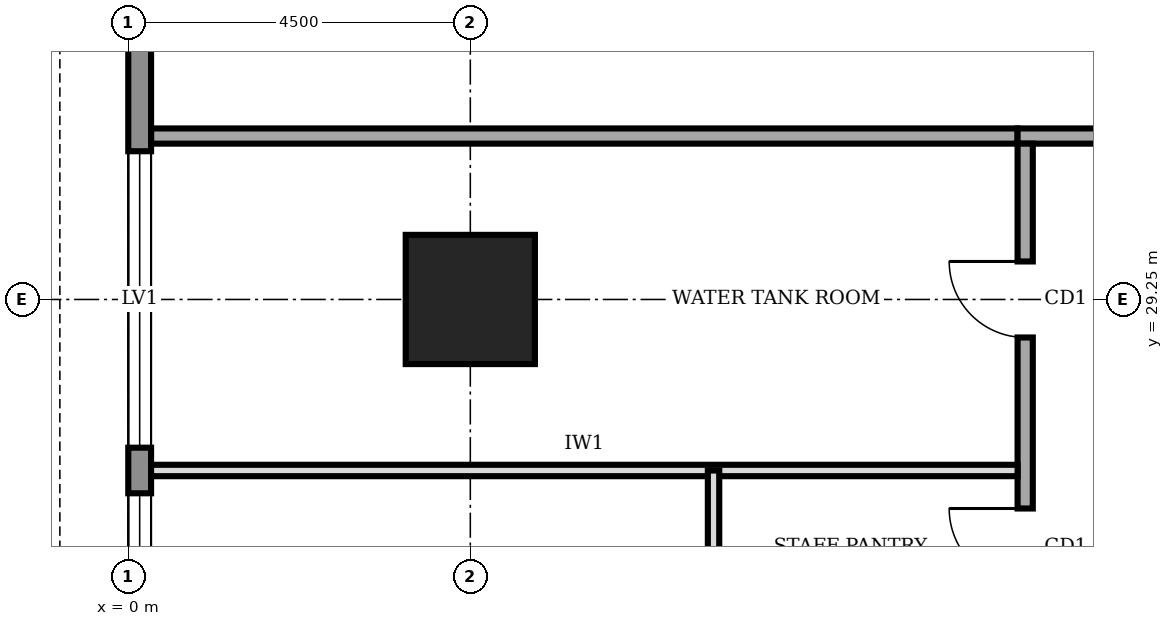
"""IFC4 building model, lengths in metres.
Left out: names, types, materials, properties, quantities, classifications, styles, units other than length and angle.
Written with IfcOpenShell. Run it as: python <this file> out.ifc"""

import sys

from ifc_helpers import new_model, si_unit, direction, frame, frame_2d, origin, origin_2d, place, context, subcontext, project, spatial, rectangle, extrude, element, fill, save


model = new_model("IFC4")
c1 = context("Model", 3, precision=1e-05, world=origin(), true_north=direction((0.0, 1.0)))
c2 = subcontext(c1, "Body", "Model", "MODEL_VIEW")
j1 = project(units=[si_unit("LENGTHUNIT", "METRE"), si_unit("PLANEANGLEUNIT", "RADIAN")], contexts=[c1])
p1 = place(None, origin())
s1 = spatial("IfcSite", under=j1, at=p1, CompositionType="ELEMENT")
p2 = place(p1, origin())
s2 = spatial("IfcBuilding", under=s1, at=p2, CompositionType="ELEMENT")
p3 = place(p2, frame((0.0, 0.0, 289.0)))
s3 = spatial("IfcBuildingStorey", under=s2, at=p3, CompositionType="ELEMENT", Elevation=289.0)
p4 = place(p3, frame((4.5, 29.25, 0.0), z_axis=(0.0, 0.0, 1.0), x_axis=(1.0, 0.0, 0.0)))
e1 = element("IfcColumn", 1, at=p4, inside=s3, PredefinedType="COLUMN", context=c2, shape_type="SweptSolid", body=[
    extrude(rectangle(XDim=1.7, YDim=1.7, at=origin_2d()), origin(), (0.0, 0.0, 1.0), 4.0),
])
p5 = place(p3, frame((0.15, 35.98, 0.0), z_axis=(0.0, 0.0, 1.0), x_axis=(0.0, -1.0, 0.0)))
e2 = element("IfcWall", 2, at=p5, inside=s3, PredefinedType="STANDARD", context=c2, shape_type="SweptSolid", body=[
    extrude(rectangle(XDim=31.46, YDim=0.3, at=frame_2d((15.73, 0.0))), origin(), (0.0, 0.0, 1.0), 3.75),
])
p6 = place(p5, frame((27.28, 0.0, 0.9)))
e3 = element("IfcOpeningElement", 3, at=p6, cuts=e2, PredefinedType="OPENING", context=c2, shape_type="SweptSolid", body=[
    extrude(rectangle(XDim=3.9, YDim=2.2, at=frame_2d((1.95, 1.1))), frame((0.0, 0.16, 0.0), z_axis=(0.0, -1.0, 0.0), x_axis=(1.0, 0.0, 0.0)), (0.0, 0.0, 1.0), 0.32),
])
p7 = place(p5, frame((22.78, 0.0, 0.9)))
e4 = element("IfcOpeningElement", 4, at=p7, cuts=e2, PredefinedType="OPENING", context=c2, shape_type="SweptSolid", body=[
    extrude(rectangle(XDim=3.9, YDim=2.2, at=frame_2d((1.95, 1.1))), frame((0.0, 0.16, 0.0), z_axis=(0.0, -1.0, 0.0), x_axis=(1.0, 0.0, 0.0)), (0.0, 0.0, 1.0), 0.32),
])
p8 = place(p5, frame((18.28, 0.0, 0.9)))
e5 = element("IfcOpeningElement", 5, at=p8, cuts=e2, PredefinedType="OPENING", context=c2, shape_type="SweptSolid", body=[
    extrude(rectangle(XDim=3.9, YDim=2.2, at=frame_2d((1.95, 1.1))), frame((0.0, 0.16, 0.0), z_axis=(0.0, -1.0, 0.0), x_axis=(1.0, 0.0, 0.0)), (0.0, 0.0, 1.0), 0.32),
])
p9 = place(p5, frame((13.78, 0.0, 0.9)))
e6 = element("IfcOpeningElement", 6, at=p9, cuts=e2, PredefinedType="OPENING", context=c2, shape_type="SweptSolid", body=[
    extrude(rectangle(XDim=3.9, YDim=2.2, at=frame_2d((1.95, 1.1))), frame((0.0, 0.16, 0.0), z_axis=(0.0, -1.0, 0.0), x_axis=(1.0, 0.0, 0.0)), (0.0, 0.0, 1.0), 0.32),
])
p10 = place(p5, frame((9.28, 0.0, 0.9)))
e7 = element("IfcOpeningElement", 7, at=p10, cuts=e2, PredefinedType="OPENING", context=c2, shape_type="SweptSolid", body=[
    extrude(rectangle(XDim=3.9, YDim=2.2, at=frame_2d((1.95, 1.1))), frame((0.0, 0.16, 0.0), z_axis=(0.0, -1.0, 0.0), x_axis=(1.0, 0.0, 0.0)), (0.0, 0.0, 1.0), 0.32),
])
p11 = place(p5, frame((4.78, 0.0, 0.9)))
e8 = element("IfcOpeningElement", 8, at=p11, cuts=e2, PredefinedType="OPENING", context=c2, shape_type="SweptSolid", body=[
    extrude(rectangle(XDim=3.9, YDim=2.2, at=frame_2d((1.95, 1.1))), frame((0.0, 0.16, 0.0), z_axis=(0.0, -1.0, 0.0), x_axis=(1.0, 0.0, 0.0)), (0.0, 0.0, 1.0), 0.32),
])
p12 = place(p3, frame((28.6, 31.4, 0.0), z_axis=(0.0, 0.0, 1.0), x_axis=(-1.0, 0.0, 0.0)))
e9 = element("IfcWall", 9, at=p12, inside=s3, PredefinedType="SOLIDWALL", context=c2, shape_type="SweptSolid", body=[
    extrude(rectangle(XDim=16.9, YDim=0.2, at=frame_2d((8.45, 0.0))), origin(), (0.0, 0.0, 1.0), 3.75),
])
p13 = place(p12, frame((12.55, 0.0, 0.0)))
e10 = element("IfcOpeningElement", 10, at=p13, cuts=e9, PredefinedType="OPENING", context=c2, shape_type="SweptSolid", body=[
    extrude(rectangle(XDim=2.4, YDim=2.7, at=frame_2d((1.2, 1.35))), frame((0.0, 0.11, 0.0), z_axis=(0.0, -1.0, 0.0), x_axis=(1.0, 0.0, 0.0)), (0.0, 0.0, 1.0), 0.22),
])
p14 = place(p12, frame((4.3, 0.0, 0.0)))
e11 = element("IfcOpeningElement", 11, at=p14, cuts=e9, PredefinedType="OPENING", context=c2, shape_type="SweptSolid", body=[
    extrude(rectangle(XDim=1.8, YDim=2.1, at=frame_2d((0.9, 1.05))), frame((0.0, 0.11, 0.0), z_axis=(0.0, -1.0, 0.0), x_axis=(1.0, 0.0, 0.0)), (0.0, 0.0, 1.0), 0.22),
])
p15 = place(p3, frame((11.8, 31.3, 0.0), z_axis=(0.0, 0.0, 1.0), x_axis=(0.0, -1.0, 0.0)))
e12 = element("IfcWall", 12, at=p15, inside=s3, PredefinedType="SOLIDWALL", context=c2, shape_type="SweptSolid", body=[
    extrude(rectangle(XDim=22.3, YDim=0.2, at=frame_2d((11.15, 0.0))), origin(), (0.0, 0.0, 1.0), 3.75),
])
p16 = place(p15, frame((19.55, 0.0, 0.0)))
e13 = element("IfcOpeningElement", 13, at=p16, cuts=e12, PredefinedType="OPENING", context=c2, shape_type="SweptSolid", body=[
    extrude(rectangle(XDim=1.0, YDim=2.1, at=frame_2d((0.5, 1.05))), frame((0.0, 0.11, 0.0), z_axis=(0.0, -1.0, 0.0), x_axis=(1.0, 0.0, 0.0)), (0.0, 0.0, 1.0), 0.22),
])
p17 = place(p15, frame((15.45, 0.0, 0.0)))
e14 = element("IfcOpeningElement", 14, at=p17, cuts=e12, PredefinedType="OPENING", context=c2, shape_type="SweptSolid", body=[
    extrude(rectangle(XDim=0.9, YDim=2.1, at=frame_2d((0.45, 1.05))), frame((0.0, 0.11, 0.0), z_axis=(0.0, -1.0, 0.0), x_axis=(1.0, 0.0, 0.0)), (0.0, 0.0, 1.0), 0.22),
])
p18 = place(p15, frame((12.45, 0.0, 0.0)))
e15 = element("IfcOpeningElement", 15, at=p18, cuts=e12, PredefinedType="OPENING", context=c2, shape_type="SweptSolid", body=[
    extrude(rectangle(XDim=0.9, YDim=2.1, at=frame_2d((0.45, 1.05))), frame((0.0, 0.11, 0.0), z_axis=(0.0, -1.0, 0.0), x_axis=(1.0, 0.0, 0.0)), (0.0, 0.0, 1.0), 0.22),
])
p19 = place(p15, frame((7.6, 0.0, 0.0)))
e16 = element("IfcOpeningElement", 16, at=p19, cuts=e12, PredefinedType="OPENING", context=c2, shape_type="SweptSolid", body=[
    extrude(rectangle(XDim=0.9, YDim=2.1, at=frame_2d((0.45, 1.05))), frame((0.0, 0.11, 0.0), z_axis=(0.0, -1.0, 0.0), x_axis=(1.0, 0.0, 0.0)), (0.0, 0.0, 1.0), 0.22),
])
p20 = place(p15, frame((4.8, 0.0, 0.0)))
e17 = element("IfcOpeningElement", 17, at=p20, cuts=e12, PredefinedType="OPENING", context=c2, shape_type="SweptSolid", body=[
    extrude(rectangle(XDim=1.0, YDim=2.1, at=frame_2d((0.5, 1.05))), frame((0.0, 0.11, 0.0), z_axis=(0.0, -1.0, 0.0), x_axis=(1.0, 0.0, 0.0)), (0.0, 0.0, 1.0), 0.22),
])
p21 = place(p15, frame((10.3, 0.0, 0.0)))
e18 = element("IfcOpeningElement", 18, at=p21, cuts=e12, PredefinedType="OPENING", context=c2, shape_type="SweptSolid", body=[
    extrude(rectangle(XDim=1.0, YDim=2.1, at=frame_2d((0.5, 1.05))), frame((0.0, 0.11, 0.0), z_axis=(0.0, -1.0, 0.0), x_axis=(1.0, 0.0, 0.0)), (0.0, 0.0, 1.0), 0.22),
])
p22 = place(p15, frame((1.55, 0.0, 0.0)))
e19 = element("IfcOpeningElement", 19, at=p22, cuts=e12, PredefinedType="OPENING", context=c2, shape_type="SweptSolid", body=[
    extrude(rectangle(XDim=1.0, YDim=2.1, at=frame_2d((0.5, 1.05))), frame((0.0, 0.11, 0.0), z_axis=(0.0, -1.0, 0.0), x_axis=(1.0, 0.0, 0.0)), (0.0, 0.0, 1.0), 0.22),
])
p23 = place(p3, frame((0.3, 31.4, 0.0), z_axis=(0.0, 0.0, 1.0), x_axis=(1.0, 0.0, 0.0)))
e20 = element("IfcWall", 20, at=p23, inside=s3, PredefinedType="SOLIDWALL", context=c2, shape_type="SweptSolid", body=[
    extrude(rectangle(XDim=11.4, YDim=0.2, at=frame_2d((5.7, 0.0))), origin(), (0.0, 0.0, 1.0), 3.75),
])
p24 = place(p3, frame((0.3, 27.0, 0.0), z_axis=(0.0, 0.0, 1.0), x_axis=(1.0, 0.0, 0.0)))
e21 = element("IfcWall", 21, at=p24, inside=s3, PredefinedType="PARTITIONING", context=c2, shape_type="SweptSolid", body=[
    extrude(rectangle(XDim=11.4, YDim=0.15, at=frame_2d((5.7, 0.0))), origin(), (0.0, 0.0, 1.0), 3.75),
])
p25 = place(p3, frame((7.7, 25.0, 0.0), z_axis=(0.0, 0.0, 1.0), x_axis=(0.0, 1.0, 0.0)))
e22 = element("IfcWall", 22, at=p25, inside=s3, PredefinedType="PARTITIONING", context=c2, shape_type="SweptSolid", body=[
    extrude(rectangle(XDim=2.0, YDim=0.15, at=frame_2d((1.0, 0.0))), origin(), (0.0, 0.0, 1.0), 3.75),
])
p26 = place(p10, origin())
e23 = element("IfcWindow", 23, at=p26, inside=s3, PartitioningType="SINGLE_PANEL", PredefinedType="WINDOW", context=c2, shape_type="SweptSolid", body=[
    extrude(rectangle(XDim=3.9, YDim=2.2, at=frame_2d((1.95, 1.1))), frame((0.0, 0.03, 0.0), z_axis=(0.0, -1.0, 0.0), x_axis=(1.0, 0.0, 0.0)), (0.0, 0.0, 1.0), 0.06),
])
fill(e7, e23)
p27 = place(p11, origin())
e24 = element("IfcWindow", 24, at=p27, inside=s3, PartitioningType="SINGLE_PANEL", PredefinedType="WINDOW", context=c2, shape_type="SweptSolid", body=[
    extrude(rectangle(XDim=3.9, YDim=2.2, at=frame_2d((1.95, 1.1))), frame((0.0, 0.03, 0.0), z_axis=(0.0, -1.0, 0.0), x_axis=(1.0, 0.0, 0.0)), (0.0, 0.0, 1.0), 0.06),
])
fill(e8, e24)
p28 = place(p20, frame((1.0, 0.0, 0.0), z_axis=(0.0, 0.0, 1.0), x_axis=(-1.0, 0.0, 0.0)))
e25 = element("IfcDoor", 25, at=p28, inside=s3, OperationType="SINGLE_SWING_RIGHT", PredefinedType="DOOR", context=c2, shape_type="SweptSolid", body=[
    extrude(rectangle(XDim=1.0, YDim=2.1, at=frame_2d((0.5, 1.05))), frame((0.0, 0.025, 0.0), z_axis=(0.0, -1.0, 0.0), x_axis=(1.0, 0.0, 0.0)), (0.0, 0.0, 1.0), 0.05),
])
fill(e17, e25)
p29 = place(p22, frame((1.0, 0.0, 0.0), z_axis=(0.0, 0.0, 1.0), x_axis=(-1.0, 0.0, 0.0)))
e26 = element("IfcDoor", 26, at=p29, inside=s3, OperationType="SINGLE_SWING_RIGHT", PredefinedType="DOOR", context=c2, shape_type="SweptSolid", body=[
    extrude(rectangle(XDim=1.0, YDim=2.1, at=frame_2d((0.5, 1.05))), frame((0.0, 0.025, 0.0), z_axis=(0.0, -1.0, 0.0), x_axis=(1.0, 0.0, 0.0)), (0.0, 0.0, 1.0), 0.05),
])
fill(e19, e26)
save(model, sys.argv[1])
